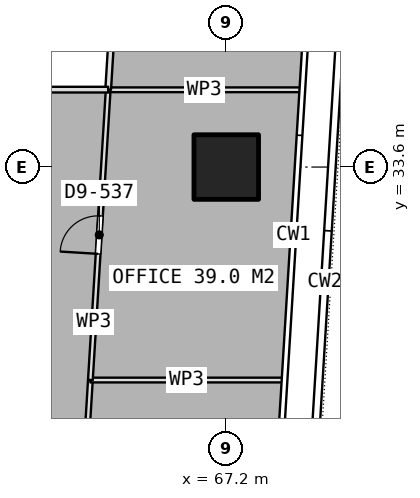
"""IFC4 building model, lengths in metres.
Left out: names, types, materials, properties, quantities, classifications, styles, units other than length and angle.
Written with IfcOpenShell. Run it as: python <this file> out.ifc"""

import sys

from ifc_helpers import new_model, si_unit, direction, frame, frame_2d, origin, origin_2d, place, context, subcontext, project, spatial, rectangle, extrude, element, fill, save


model = new_model("IFC4")
c1 = context("Model", 3, precision=1e-05, world=origin(), true_north=direction((0.0, 1.0)))
c2 = subcontext(c1, "Body", "Model", "MODEL_VIEW")
j1 = project(units=[si_unit("LENGTHUNIT", "METRE"), si_unit("PLANEANGLEUNIT", "RADIAN")], contexts=[c1])
p1 = place(None, origin())
s1 = spatial("IfcSite", under=j1, at=p1, CompositionType="ELEMENT")
p2 = place(p1, origin())
s2 = spatial("IfcBuilding", under=s1, at=p2, CompositionType="ELEMENT")
p3 = place(p2, frame((0.0, 0.0, 136.55)))
s3 = spatial("IfcBuildingStorey", under=s2, at=p3, CompositionType="ELEMENT", Elevation=136.55)
p4 = place(p3, frame((67.2, 33.6, 0.0), z_axis=(0.0, 0.0, 1.0), x_axis=(1.0, 0.0, 0.0)))
e1 = element("IfcColumn", 1, at=p4, inside=s3, PredefinedType="COLUMN", context=c2, shape_type="SweptSolid", body=[
    extrude(rectangle(XDim=1.7, YDim=1.7, at=origin_2d()), origin(), (0.0, 0.0, 1.0), 3.75),
])
p5 = place(p3, frame((63.193, 20.939, 0.0), z_axis=(0.0, 0.0, 1.0), x_axis=(0.061084086736, 0.998132623627, 0.0)))
e2 = element("IfcWall", 2, at=p5, inside=s3, PredefinedType="PARTITIONING", context=c2, shape_type="SweptSolid", body=[
    extrude(rectangle(XDim=7.07, YDim=0.125, at=frame_2d((3.535, 0.0))), origin(), (0.0, 0.0, 1.0), 3.5),
])
p6 = place(p5, frame((2.133, 0.0, 0.0)))
e3 = element("IfcOpeningElement", 3, at=p6, cuts=e2, PredefinedType="OPENING", context=c2, shape_type="SweptSolid", body=[
    extrude(rectangle(XDim=1.8, YDim=2.1, at=frame_2d((0.9, 1.05))), frame((0.0, 0.073, 0.0), z_axis=(0.0, -1.0, 0.0), x_axis=(1.0, 0.0, 0.0)), (0.0, 0.0, 1.0), 0.145),
])
p7 = place(p3, frame((63.625, 27.996, 0.0), z_axis=(0.0, 0.0, 1.0), x_axis=(1.0, 0.0, 0.0)))
e4 = element("IfcWall", 4, at=p7, inside=s3, PredefinedType="PARTITIONING", context=c2, shape_type="SweptSolid", body=[
    extrude(rectangle(XDim=5.059, YDim=0.125, at=frame_2d((2.53, 0.0))), origin(), (0.0, 0.0, 1.0), 3.5),
])
p8 = place(p3, frame((63.625, 27.997, 0.0), z_axis=(0.0, 0.0, 1.0), x_axis=(0.061176245149, 0.998126979412, 0.0)))
e5 = element("IfcWall", 5, at=p8, inside=s3, PredefinedType="PARTITIONING", context=c2, shape_type="SweptSolid", body=[
    extrude(rectangle(XDim=7.65, YDim=0.125, at=frame_2d((3.825, 0.0))), origin(), (0.0, 0.0, 1.0), 3.5),
])
p9 = place(p8, frame((3.325, 0.0, 0.0)))
e6 = element("IfcOpeningElement", 6, at=p9, cuts=e5, PredefinedType="OPENING", context=c2, shape_type="SweptSolid", body=[
    extrude(rectangle(XDim=1.0, YDim=2.1, at=frame_2d((0.5, 1.05))), frame((0.0, 0.073, 0.0), z_axis=(0.0, -1.0, 0.0), x_axis=(1.0, 0.0, 0.0)), (0.0, 0.0, 1.0), 0.145),
])
p10 = place(p3, frame((64.093, 35.633, 0.0), z_axis=(0.0, 0.0, 1.0), x_axis=(1.0, 0.0, 0.0)))
e7 = element("IfcWall", 7, at=p10, inside=s3, PredefinedType="PARTITIONING", context=c2, shape_type="SweptSolid", body=[
    extrude(rectangle(XDim=5.059, YDim=0.125, at=frame_2d((2.53, 0.0))), origin(), (0.0, 0.0, 1.0), 3.5),
])
p11 = place(p3, frame((64.093, 35.637, 0.0), z_axis=(0.0, 0.0, 1.0), x_axis=(0.060920139636, 0.998142643407, 0.0)))
e8 = element("IfcWall", 8, at=p11, inside=s3, PredefinedType="PARTITIONING", context=c2, shape_type="SweptSolid", body=[
    extrude(rectangle(XDim=1.803, YDim=0.15, at=frame_2d((0.902, 0.0))), origin(), (0.0, 0.0, 1.0), 3.5),
])
p12 = place(p3, frame((53.2, 35.637, 0.0), z_axis=(0.0, 0.0, 1.0), x_axis=(1.0, 0.0, 0.0)))
e9 = element("IfcWall", 9, at=p12, inside=s3, PredefinedType="PARTITIONING", context=c2, shape_type="SweptSolid", body=[
    extrude(rectangle(XDim=10.893, YDim=0.15, at=frame_2d((5.447, 0.0))), origin(), (0.0, 0.0, 1.0), 3.5),
])
p13 = place(p9, origin())
e10 = element("IfcDoor", 10, at=p13, inside=s3, OperationType="SINGLE_SWING_LEFT", PredefinedType="DOOR", context=c2, shape_type="SweptSolid", body=[
    extrude(rectangle(XDim=1.0, YDim=2.1, at=frame_2d((0.5, 1.05))), frame((0.0, 0.025, 0.0), z_axis=(0.0, -1.0, 0.0), x_axis=(1.0, 0.0, 0.0)), (0.0, 0.0, 1.0), 0.05),
])
fill(e6, e10)
save(model, sys.argv[1])
